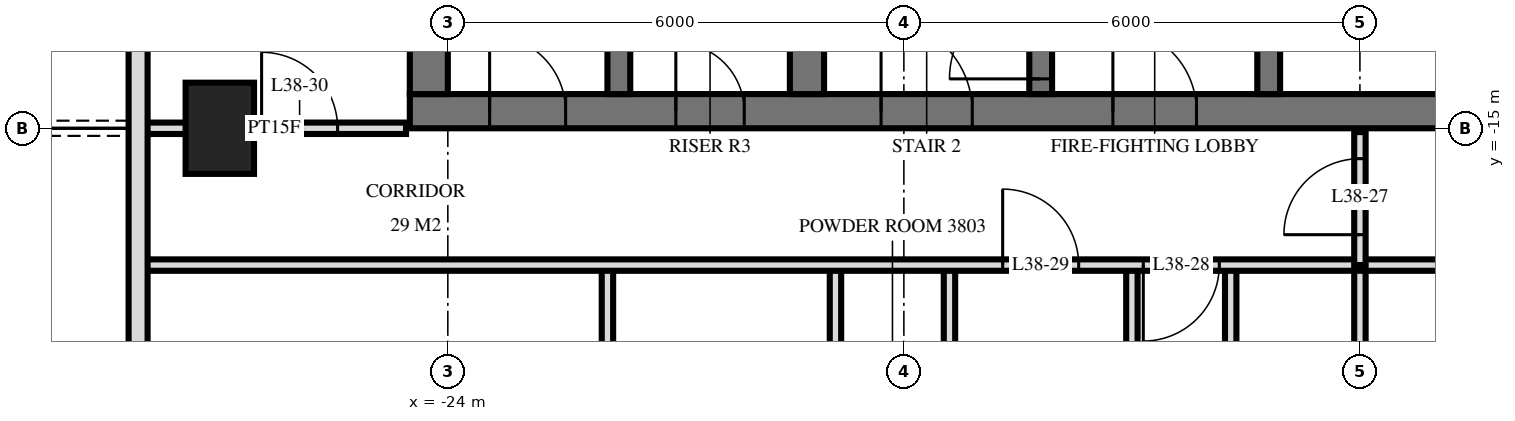
"""IFC4 building model, lengths in metres.
Left out: names, types, materials, properties, quantities, classifications, styles, units other than length and angle.
Written with IfcOpenShell. Run it as: python <this file> out.ifc"""

import sys

from ifc_helpers import new_model, si_unit, direction, frame, frame_2d, origin, origin_2d, place, context, subcontext, project, spatial, rectangle, extrude, element, fill, save


model = new_model("IFC4")
c1 = context("Model", 3, precision=1e-05, world=origin(), true_north=direction((0.0, 1.0)))
c2 = subcontext(c1, "Body", "Model", "MODEL_VIEW")
j1 = project(units=[si_unit("LENGTHUNIT", "METRE"), si_unit("PLANEANGLEUNIT", "RADIAN")], contexts=[c1])
p1 = place(None, origin())
s1 = spatial("IfcSite", under=j1, at=p1, CompositionType="ELEMENT")
p2 = place(p1, origin())
s2 = spatial("IfcBuilding", under=s1, at=p2, CompositionType="ELEMENT")
p3 = place(p2, frame((0.0, 0.0, 148.8)))
s3 = spatial("IfcBuildingStorey", under=s2, at=p3, CompositionType="ELEMENT", Elevation=148.8)
p4 = place(p3, frame((-27.0, -15.0, 0.0), z_axis=(0.0, 0.0, 1.0), x_axis=(0.0, 1.0, 0.0)))
e1 = element("IfcColumn", 1, at=p4, inside=s3, PredefinedType="COLUMN", context=c2, shape_type="SweptSolid", body=[
    extrude(rectangle(XDim=1.2, YDim=0.9, at=origin_2d()), origin(), (0.0, 0.0, 1.0), 3.6),
])
p5 = place(p3, frame((-24.5, -14.775, 0.0), z_axis=(0.0, 0.0, 1.0), x_axis=(1.0, 0.0, 0.0)))
e2 = element("IfcWall", 2, at=p5, inside=s3, PredefinedType="SHEAR", context=c2, shape_type="SweptSolid", body=[
    extrude(rectangle(XDim=14.5, YDim=0.45, at=frame_2d((7.25, 0.0))), origin(), (0.0, 0.0, 1.0), 3.6),
])
p6 = place(p5, frame((6.2, 0.0, 0.0)))
e3 = element("IfcOpeningElement", 3, at=p6, cuts=e2, PredefinedType="OPENING", context=c2, shape_type="SweptSolid", body=[
    extrude(rectangle(XDim=1.2, YDim=2.1, at=frame_2d((0.6, 1.05))), frame((0.0, 0.235, 0.0), z_axis=(0.0, -1.0, 0.0), x_axis=(1.0, 0.0, 0.0)), (0.0, 0.0, 1.0), 0.47),
])
p7 = place(p5, frame((9.25, 0.0, 0.0)))
e4 = element("IfcOpeningElement", 4, at=p7, cuts=e2, PredefinedType="OPENING", context=c2, shape_type="SweptSolid", body=[
    extrude(rectangle(XDim=1.1, YDim=2.1, at=frame_2d((0.55, 1.05))), frame((0.0, 0.235, 0.0), z_axis=(0.0, -1.0, 0.0), x_axis=(1.0, 0.0, 0.0)), (0.0, 0.0, 1.0), 0.47),
])
p8 = place(p5, frame((3.5, 0.0, 0.0)))
e5 = element("IfcOpeningElement", 5, at=p8, cuts=e2, PredefinedType="OPENING", context=c2, shape_type="SweptSolid", body=[
    extrude(rectangle(XDim=0.9, YDim=2.1, at=frame_2d((0.45, 1.05))), frame((0.0, 0.235, 0.0), z_axis=(0.0, -1.0, 0.0), x_axis=(1.0, 0.0, 0.0)), (0.0, 0.0, 1.0), 0.47),
])
p9 = place(p5, frame((1.05, 0.0, 0.0)))
e6 = element("IfcOpeningElement", 6, at=p9, cuts=e2, PredefinedType="OPENING", context=c2, shape_type="SweptSolid", body=[
    extrude(rectangle(XDim=1.0, YDim=2.1, at=frame_2d((0.5, 1.05))), frame((0.0, 0.235, 0.0), z_axis=(0.0, -1.0, 0.0), x_axis=(1.0, 0.0, 0.0)), (0.0, 0.0, 1.0), 0.47),
])
p10 = place(p3, frame((-24.25, -14.55, 0.0), z_axis=(0.0, 0.0, 1.0), x_axis=(0.0, 1.0, 0.0)))
e7 = element("IfcWall", 7, at=p10, inside=s3, PredefinedType="SHEAR", context=c2, shape_type="SweptSolid", body=[
    extrude(rectangle(XDim=14.1, YDim=0.5, at=frame_2d((7.05, 0.0))), origin(), (0.0, 0.0, 1.0), 3.6),
])
p11 = place(p3, frame((-13.2, -14.55, 0.0), z_axis=(0.0, 0.0, 1.0), x_axis=(0.0, 1.0, 0.0)))
e8 = element("IfcWall", 8, at=p11, inside=s3, PredefinedType="SHEAR", context=c2, shape_type="SweptSolid", body=[
    extrude(rectangle(XDim=5.4, YDim=0.3, at=frame_2d((2.7, 0.0))), origin(), (0.0, 0.0, 1.0), 3.6),
])
p12 = place(p11, frame((4.0, 0.0, 0.0)))
e9 = element("IfcOpeningElement", 9, at=p12, cuts=e8, PredefinedType="OPENING", context=c2, shape_type="SweptSolid", body=[
    extrude(rectangle(XDim=1.2, YDim=2.1, at=frame_2d((0.6, 1.05))), frame((0.0, 0.16, 0.0), z_axis=(0.0, -1.0, 0.0), x_axis=(1.0, 0.0, 0.0)), (0.0, 0.0, 1.0), 0.32),
])
p13 = place(p3, frame((-16.2, -14.55, 0.0), z_axis=(0.0, 0.0, 1.0), x_axis=(0.0, 1.0, 0.0)))
e10 = element("IfcWall", 10, at=p13, inside=s3, PredefinedType="SHEAR", context=c2, shape_type="SweptSolid", body=[
    extrude(rectangle(XDim=5.4, YDim=0.3, at=frame_2d((2.7, 0.0))), origin(), (0.0, 0.0, 1.0), 3.6),
])
p14 = place(p13, frame((0.2, 0.0, 0.0)))
e11 = element("IfcOpeningElement", 11, at=p14, cuts=e10, PredefinedType="OPENING", context=c2, shape_type="SweptSolid", body=[
    extrude(rectangle(XDim=1.2, YDim=2.1, at=frame_2d((0.6, 1.05))), frame((0.0, 0.16, 0.0), z_axis=(0.0, -1.0, 0.0), x_axis=(1.0, 0.0, 0.0)), (0.0, 0.0, 1.0), 0.32),
])
p15 = place(p3, frame((-19.275, -14.55, 0.0), z_axis=(0.0, 0.0, 1.0), x_axis=(0.0, 1.0, 0.0)))
e12 = element("IfcWall", 12, at=p15, inside=s3, PredefinedType="SHEAR", context=c2, shape_type="SweptSolid", body=[
    extrude(rectangle(XDim=5.4, YDim=0.45, at=frame_2d((2.7, 0.0))), origin(), (0.0, 0.0, 1.0), 3.6),
])
p16 = place(p3, frame((-21.75, -14.55, 0.0), z_axis=(0.0, 0.0, 1.0), x_axis=(0.0, 1.0, 0.0)))
e13 = element("IfcWall", 13, at=p16, inside=s3, PredefinedType="SHEAR", context=c2, shape_type="SweptSolid", body=[
    extrude(rectangle(XDim=5.4, YDim=0.3, at=frame_2d((2.7, 0.0))), origin(), (0.0, 0.0, 1.0), 3.6),
])
p17 = place(p3, frame((-28.075, -3.325, 0.0), z_axis=(0.0, 0.0, 1.0), x_axis=(0.0, -1.0, 0.0)))
e14 = element("IfcWall", 14, at=p17, inside=s3, PredefinedType="SOLIDWALL", context=c2, shape_type="SweptSolid", body=[
    extrude(rectangle(XDim=25.951, YDim=0.25, at=frame_2d((12.975, 0.0))), origin(), (0.0, 0.0, 1.0), 3.32),
])
p18 = place(p17, frame((7.275, 0.0, 0.0)))
e15 = element("IfcOpeningElement", 15, at=p18, cuts=e14, PredefinedType="OPENING", context=c2, shape_type="SweptSolid", body=[
    extrude(rectangle(XDim=1.8, YDim=2.4, at=frame_2d((0.9, 1.2))), frame((0.0, 0.135, 0.0), z_axis=(0.0, -1.0, 0.0), x_axis=(1.0, 0.0, 0.0)), (0.0, 0.0, 1.0), 0.27),
])
p19 = place(p17, frame((18.175, 0.0, 0.0)))
e16 = element("IfcOpeningElement", 16, at=p19, cuts=e14, PredefinedType="OPENING", context=c2, shape_type="SweptSolid", body=[
    extrude(rectangle(XDim=1.8, YDim=2.4, at=frame_2d((0.9, 1.2))), frame((0.0, 0.135, 0.0), z_axis=(0.0, -1.0, 0.0), x_axis=(1.0, 0.0, 0.0)), (0.0, 0.0, 1.0), 0.27),
])
p20 = place(p17, frame((21.075, 0.0, 0.0)))
e17 = element("IfcOpeningElement", 17, at=p20, cuts=e14, PredefinedType="OPENING", context=c2, shape_type="SweptSolid", body=[
    extrude(rectangle(XDim=1.8, YDim=2.4, at=frame_2d((0.9, 1.2))), frame((0.0, 0.135, 0.0), z_axis=(0.0, -1.0, 0.0), x_axis=(1.0, 0.0, 0.0)), (0.0, 0.0, 1.0), 0.27),
])
p21 = place(p17, frame((23.825, 0.0, 0.3)))
e18 = element("IfcOpeningElement", 18, at=p21, cuts=e14, PredefinedType="OPENING", context=c2, shape_type="SweptSolid", body=[
    extrude(rectangle(XDim=1.8, YDim=2.1, at=frame_2d((0.9, 1.05))), frame((0.0, 0.135, 0.0), z_axis=(0.0, -1.0, 0.0), x_axis=(1.0, 0.0, 0.0)), (0.0, 0.0, 1.0), 0.27),
])
p22 = place(p3, frame((-12.0, -16.8, 0.0), z_axis=(0.0, 0.0, 1.0), x_axis=(0.0, 1.0, 0.0)))
e19 = element("IfcWall", 19, at=p22, inside=s3, PredefinedType="PARTITIONING", context=c2, shape_type="SweptSolid", body=[
    extrude(rectangle(XDim=1.75, YDim=0.15, at=frame_2d((0.875, 0.0))), origin(), (0.0, 0.0, 1.0), 3.32),
])
p23 = place(p22, frame((0.4, 0.0, 0.0)))
e20 = element("IfcOpeningElement", 20, at=p23, cuts=e19, PredefinedType="OPENING", context=c2, shape_type="SweptSolid", body=[
    extrude(rectangle(XDim=1.0, YDim=2.1, at=frame_2d((0.5, 1.05))), frame((0.0, 0.085, 0.0), z_axis=(0.0, -1.0, 0.0), x_axis=(1.0, 0.0, 0.0)), (0.0, 0.0, 1.0), 0.17),
])
p24 = place(p3, frame((-12.0, -33.62, 0.0), z_axis=(0.0, 0.0, 1.0), x_axis=(0.0, 1.0, 0.0)))
e21 = element("IfcWall", 21, at=p24, inside=s3, PredefinedType="PARTITIONING", context=c2, shape_type="SweptSolid", body=[
    extrude(rectangle(XDim=16.82, YDim=0.15, at=frame_2d((8.41, 0.0))), origin(), (0.0, 0.0, 1.0), 3.32),
])
p25 = place(p3, frame((-13.7, -21.8, 0.0), z_axis=(0.0, 0.0, 1.0), x_axis=(0.0, 1.0, 0.0)))
e22 = element("IfcWall", 22, at=p25, inside=s3, PredefinedType="PARTITIONING", context=c2, shape_type="SweptSolid", body=[
    extrude(rectangle(XDim=5.0, YDim=0.15, at=frame_2d((2.5, 0.0))), origin(), (0.0, 0.0, 1.0), 3.32),
])
p26 = place(p25, frame((2.1, 0.0, 0.0)))
e23 = element("IfcOpeningElement", 23, at=p26, cuts=e22, PredefinedType="OPENING", context=c2, shape_type="SweptSolid", body=[
    extrude(rectangle(XDim=0.8, YDim=2.1, at=frame_2d((0.4, 1.05))), frame((0.0, 0.085, 0.0), z_axis=(0.0, -1.0, 0.0), x_axis=(1.0, 0.0, 0.0)), (0.0, 0.0, 1.0), 0.17),
])
p27 = place(p3, frame((-15.0, -21.0, 0.0), z_axis=(0.0, 0.0, 1.0), x_axis=(0.0, 1.0, 0.0)))
e24 = element("IfcWall", 24, at=p27, inside=s3, PredefinedType="PARTITIONING", context=c2, shape_type="SweptSolid", body=[
    extrude(rectangle(XDim=4.2, YDim=0.15, at=frame_2d((2.1, 0.0))), origin(), (0.0, 0.0, 1.0), 3.32),
])
p28 = place(p3, frame((-17.4, -21.0, 0.0), z_axis=(0.0, 0.0, 1.0), x_axis=(0.0, 1.0, 0.0)))
e25 = element("IfcWall", 25, at=p28, inside=s3, PredefinedType="PARTITIONING", context=c2, shape_type="SweptSolid", body=[
    extrude(rectangle(XDim=4.2, YDim=0.15, at=frame_2d((2.1, 0.0))), origin(), (0.0, 0.0, 1.0), 3.32),
])
p29 = place(p28, frame((1.6, 0.0, 0.0)))
e26 = element("IfcOpeningElement", 26, at=p29, cuts=e25, PredefinedType="OPENING", context=c2, shape_type="SweptSolid", body=[
    extrude(rectangle(XDim=1.0, YDim=2.1, at=frame_2d((0.5, 1.05))), frame((0.0, 0.085, 0.0), z_axis=(0.0, -1.0, 0.0), x_axis=(1.0, 0.0, 0.0)), (0.0, 0.0, 1.0), 0.17),
])
p30 = place(p3, frame((-18.9, -21.0, 0.0), z_axis=(0.0, 0.0, 1.0), x_axis=(0.0, 1.0, 0.0)))
e27 = element("IfcWall", 27, at=p30, inside=s3, PredefinedType="PLUMBINGWALL", context=c2, shape_type="SweptSolid", body=[
    extrude(rectangle(XDim=4.2, YDim=0.15, at=frame_2d((2.1, 0.0))), origin(), (0.0, 0.0, 1.0), 3.32),
])
p31 = place(p3, frame((-21.9, -21.0, 0.0), z_axis=(0.0, 0.0, 1.0), x_axis=(0.0, 1.0, 0.0)))
e28 = element("IfcWall", 28, at=p31, inside=s3, PredefinedType="PARTITIONING", context=c2, shape_type="SweptSolid", body=[
    extrude(rectangle(XDim=4.2, YDim=0.15, at=frame_2d((2.1, 0.0))), origin(), (0.0, 0.0, 1.0), 3.32),
])
p32 = place(p3, frame((-28.02, -16.8, 0.0), z_axis=(0.0, 0.0, 1.0), x_axis=(1.0, 0.0, 0.0)))
e29 = element("IfcWall", 29, at=p32, inside=s3, PredefinedType="PARTITIONING", context=c2, shape_type="SweptSolid", body=[
    extrude(rectangle(XDim=56.04, YDim=0.15, at=frame_2d((28.02, 0.0))), origin(), (0.0, 0.0, 1.0), 3.32),
])
p33 = place(p32, frame((13.17, 0.0, 0.0)))
e30 = element("IfcOpeningElement", 30, at=p33, cuts=e29, PredefinedType="OPENING", context=c2, shape_type="SweptSolid", body=[
    extrude(rectangle(XDim=1.0, YDim=2.1, at=frame_2d((0.5, 1.05))), frame((0.0, 0.085, 0.0), z_axis=(0.0, -1.0, 0.0), x_axis=(1.0, 0.0, 0.0)), (0.0, 0.0, 1.0), 0.17),
])
p34 = place(p32, frame((11.32, 0.0, 0.0)))
e31 = element("IfcOpeningElement", 31, at=p34, cuts=e29, PredefinedType="OPENING", context=c2, shape_type="SweptSolid", body=[
    extrude(rectangle(XDim=1.0, YDim=2.1, at=frame_2d((0.5, 1.05))), frame((0.0, 0.085, 0.0), z_axis=(0.0, -1.0, 0.0), x_axis=(1.0, 0.0, 0.0)), (0.0, 0.0, 1.0), 0.17),
])
p35 = place(p32, frame((41.87, 0.0, 0.0)))
e32 = element("IfcOpeningElement", 32, at=p35, cuts=e29, PredefinedType="OPENING", context=c2, shape_type="SweptSolid", body=[
    extrude(rectangle(XDim=1.0, YDim=2.1, at=frame_2d((0.5, 1.05))), frame((0.0, 0.085, 0.0), z_axis=(0.0, -1.0, 0.0), x_axis=(1.0, 0.0, 0.0)), (0.0, 0.0, 1.0), 0.17),
])
p36 = place(p32, frame((43.72, 0.0, 0.0)))
e33 = element("IfcOpeningElement", 33, at=p36, cuts=e29, PredefinedType="OPENING", context=c2, shape_type="SweptSolid", body=[
    extrude(rectangle(XDim=1.0, YDim=2.1, at=frame_2d((0.5, 1.05))), frame((0.0, 0.085, 0.0), z_axis=(0.0, -1.0, 0.0), x_axis=(1.0, 0.0, 0.0)), (0.0, 0.0, 1.0), 0.17),
])
p37 = place(p32, frame((19.52, 0.0, 0.0)))
e34 = element("IfcOpeningElement", 34, at=p37, cuts=e29, PredefinedType="OPENING", context=c2, shape_type="SweptSolid", body=[
    extrude(rectangle(XDim=1.0, YDim=2.1, at=frame_2d((0.5, 1.05))), frame((0.0, 0.085, 0.0), z_axis=(0.0, -1.0, 0.0), x_axis=(1.0, 0.0, 0.0)), (0.0, 0.0, 1.0), 0.17),
])
p38 = place(p32, frame((27.52, 0.0, 0.0)))
e35 = element("IfcOpeningElement", 35, at=p38, cuts=e29, PredefinedType="OPENING", context=c2, shape_type="SweptSolid", body=[
    extrude(rectangle(XDim=1.0, YDim=2.1, at=frame_2d((0.5, 1.05))), frame((0.0, 0.085, 0.0), z_axis=(0.0, -1.0, 0.0), x_axis=(1.0, 0.0, 0.0)), (0.0, 0.0, 1.0), 0.17),
])
p39 = place(p32, frame((35.52, 0.0, 0.0)))
e36 = element("IfcOpeningElement", 36, at=p39, cuts=e29, PredefinedType="OPENING", context=c2, shape_type="SweptSolid", body=[
    extrude(rectangle(XDim=1.0, YDim=2.1, at=frame_2d((0.5, 1.05))), frame((0.0, 0.085, 0.0), z_axis=(0.0, -1.0, 0.0), x_axis=(1.0, 0.0, 0.0)), (0.0, 0.0, 1.0), 0.17),
])
p40 = place(p3, frame((-28.02, -15.0, 0.0), z_axis=(0.0, 0.0, 1.0), x_axis=(1.0, 0.0, 0.0)))
e37 = element("IfcWall", 37, at=p40, inside=s3, PredefinedType="PARTITIONING", context=c2, shape_type="SweptSolid", body=[
    extrude(rectangle(XDim=3.47, YDim=0.15, at=frame_2d((1.735, 0.0))), origin(), (0.0, 0.0, 1.0), 3.32),
])
p41 = place(p40, frame((1.57, 0.0, 0.0)))
e38 = element("IfcOpeningElement", 38, at=p41, cuts=e37, PredefinedType="OPENING", context=c2, shape_type="SweptSolid", body=[
    extrude(rectangle(XDim=1.0, YDim=2.1, at=frame_2d((0.5, 1.05))), frame((0.0, 0.085, 0.0), z_axis=(0.0, -1.0, 0.0), x_axis=(1.0, 0.0, 0.0)), (0.0, 0.0, 1.0), 0.17),
])
p42 = place(p6, origin())
e39 = element("IfcDoor", 39, at=p42, inside=s3, OperationType="SINGLE_SWING_RIGHT", PredefinedType="DOOR", context=c2, shape_type="SweptSolid", body=[
    extrude(rectangle(XDim=1.2, YDim=2.1, at=frame_2d((0.6, 1.05))), frame((0.0, 0.025, 0.0), z_axis=(0.0, -1.0, 0.0), x_axis=(1.0, 0.0, 0.0)), (0.0, 0.0, 1.0), 0.05),
])
fill(e3, e39)
p43 = place(p7, origin())
e40 = element("IfcDoor", 40, at=p43, inside=s3, OperationType="SINGLE_SWING_RIGHT", PredefinedType="DOOR", context=c2, shape_type="SweptSolid", body=[
    extrude(rectangle(XDim=1.1, YDim=2.1, at=frame_2d((0.55, 1.05))), frame((0.0, 0.025, 0.0), z_axis=(0.0, -1.0, 0.0), x_axis=(1.0, 0.0, 0.0)), (0.0, 0.0, 1.0), 0.05),
])
fill(e4, e40)
p44 = place(p8, origin())
e41 = element("IfcDoor", 41, at=p44, inside=s3, OperationType="SINGLE_SWING_RIGHT", PredefinedType="DOOR", context=c2, shape_type="SweptSolid", body=[
    extrude(rectangle(XDim=0.9, YDim=2.1, at=frame_2d((0.45, 1.05))), frame((0.0, 0.025, 0.0), z_axis=(0.0, -1.0, 0.0), x_axis=(1.0, 0.0, 0.0)), (0.0, 0.0, 1.0), 0.05),
])
fill(e5, e41)
p45 = place(p9, origin())
e42 = element("IfcDoor", 42, at=p45, inside=s3, OperationType="SINGLE_SWING_RIGHT", PredefinedType="DOOR", context=c2, shape_type="SweptSolid", body=[
    extrude(rectangle(XDim=1.0, YDim=2.1, at=frame_2d((0.5, 1.05))), frame((0.0, 0.025, 0.0), z_axis=(0.0, -1.0, 0.0), x_axis=(1.0, 0.0, 0.0)), (0.0, 0.0, 1.0), 0.05),
])
fill(e6, e42)
p46 = place(p14, origin())
e43 = element("IfcDoor", 43, at=p46, inside=s3, OperationType="SINGLE_SWING_RIGHT", PredefinedType="DOOR", context=c2, shape_type="SweptSolid", body=[
    extrude(rectangle(XDim=1.2, YDim=2.1, at=frame_2d((0.6, 1.05))), frame((0.0, 0.025, 0.0), z_axis=(0.0, -1.0, 0.0), x_axis=(1.0, 0.0, 0.0)), (0.0, 0.0, 1.0), 0.05),
])
fill(e11, e43)
p47 = place(p23, origin())
e44 = element("IfcDoor", 44, at=p47, inside=s3, OperationType="SINGLE_SWING_RIGHT", PredefinedType="DOOR", context=c2, shape_type="SweptSolid", body=[
    extrude(rectangle(XDim=1.0, YDim=2.1, at=frame_2d((0.5, 1.05))), frame((0.0, 0.025, 0.0), z_axis=(0.0, -1.0, 0.0), x_axis=(1.0, 0.0, 0.0)), (0.0, 0.0, 1.0), 0.05),
])
fill(e20, e44)
p48 = place(p33, frame((0.5, 0.0, 0.0), z_axis=(0.0, 0.0, 1.0), x_axis=(-1.0, 0.0, 0.0)))
e45 = element("IfcDoor", 45, at=p48, inside=s3, OperationType="SINGLE_SWING_LEFT", PredefinedType="DOOR", context=c2, shape_type="SweptSolid", body=[
    extrude(rectangle(XDim=1.0, YDim=2.1, at=frame_2d((0.0, 1.05))), frame((0.0, -0.025, 0.0), z_axis=(0.0, 1.0, 0.0), x_axis=(-1.0, 0.0, 0.0)), (0.0, 0.0, 1.0), 0.05),
])
fill(e30, e45)
p49 = place(p34, origin())
e46 = element("IfcDoor", 46, at=p49, inside=s3, OperationType="SINGLE_SWING_RIGHT", PredefinedType="DOOR", context=c2, shape_type="SweptSolid", body=[
    extrude(rectangle(XDim=1.0, YDim=2.1, at=frame_2d((0.5, 1.05))), frame((0.0, 0.025, 0.0), z_axis=(0.0, -1.0, 0.0), x_axis=(1.0, 0.0, 0.0)), (0.0, 0.0, 1.0), 0.05),
])
fill(e31, e46)
p50 = place(p41, origin())
e47 = element("IfcDoor", 47, at=p50, inside=s3, OperationType="SINGLE_SWING_RIGHT", PredefinedType="DOOR", context=c2, shape_type="SweptSolid", body=[
    extrude(rectangle(XDim=1.0, YDim=2.1, at=frame_2d((0.5, 1.05))), frame((0.0, 0.025, 0.0), z_axis=(0.0, -1.0, 0.0), x_axis=(1.0, 0.0, 0.0)), (0.0, 0.0, 1.0), 0.05),
])
fill(e38, e47)
save(model, sys.argv[1])
